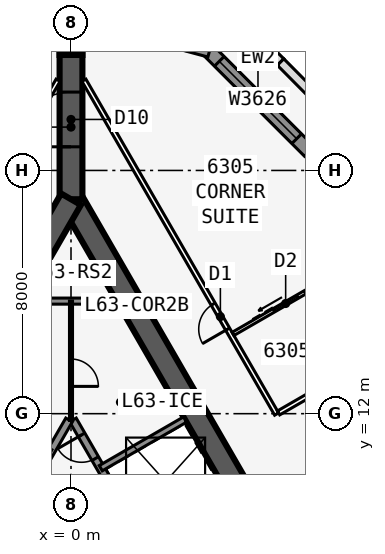
"""IFC4 building model, lengths in metres.
Left out: names, types, materials, properties, quantities, classifications, styles, units other than length and angle.
Written with IfcOpenShell. Run it as: python <this file> out.ifc"""

import sys

from ifc_helpers import new_model, si_unit, direction, frame, frame_2d, origin, place, context, subcontext, project, spatial, polyline, rectangle, outline, extrude, element, fill, save


model = new_model("IFC4")
c1 = context("Model", 3, precision=1e-05, world=origin(), true_north=direction((0.0, 1.0)))
c2 = subcontext(c1, "Body", "Model", "MODEL_VIEW")
j1 = project(units=[si_unit("LENGTHUNIT", "METRE"), si_unit("PLANEANGLEUNIT", "RADIAN")], contexts=[c1])
p1 = place(None, origin())
s1 = spatial("IfcSite", under=j1, at=p1, CompositionType="ELEMENT")
p2 = place(p1, origin())
s2 = spatial("IfcBuilding", under=s1, at=p2, CompositionType="ELEMENT")
p3 = place(p2, frame((0.0, 0.0, 239.3)))
s3 = spatial("IfcBuildingStorey", under=s2, at=p3, CompositionType="ELEMENT", Elevation=239.3)
p4 = place(p3, frame((16.5, -9.526, 0.0), z_axis=(0.0, 0.0, 1.0), x_axis=(-0.499999749417, 0.866025548458, 0.0)))
e1 = element("IfcWall", 1, at=p4, inside=s3, PredefinedType="SHEAR", context=c2, shape_type="SweptSolid", body=[
    extrude(rectangle(XDim=33.0, YDim=0.75, at=frame_2d((16.5, 0.0))), origin(), (0.0, 0.0, 1.0), 3.6),
])
p5 = place(p4, frame((14.15, 0.0, 0.0)))
e2 = element("IfcOpeningElement", 2, at=p5, cuts=e1, PredefinedType="OPENING", context=c2, shape_type="SweptSolid", body=[
    extrude(rectangle(XDim=1.8, YDim=2.13, at=frame_2d((0.9, 1.065))), frame((0.0, 0.385, 0.0), z_axis=(0.0, -1.0, 0.0), x_axis=(1.0, 0.0, 0.0)), (0.0, 0.0, 1.0), 0.77),
])
p6 = place(p4, frame((12.6, 0.0, 0.0)))
e3 = element("IfcOpeningElement", 3, at=p6, cuts=e1, PredefinedType="OPENING", context=c2, shape_type="SweptSolid", body=[
    extrude(rectangle(XDim=1.0, YDim=2.13, at=frame_2d((0.5, 1.065))), frame((0.0, 0.385, 0.0), z_axis=(0.0, -1.0, 0.0), x_axis=(1.0, 0.0, 0.0)), (0.0, 0.0, 1.0), 0.77),
])
p7 = place(p3, frame((5.379, 2.586, 0.0), z_axis=(0.0, 0.0, 1.0), x_axis=(-0.500001375892, 0.866024609411, 0.0)))
e4 = element("IfcWall", 4, at=p7, inside=s3, PredefinedType="SOLIDWALL", context=c2, shape_type="SweptSolid", body=[
    extrude(rectangle(XDim=10.633, YDim=0.25, at=frame_2d((5.316, 0.0))), origin(), (0.0, 0.0, 1.0), 3.435),
])
p8 = place(p7, frame((9.164, 0.0, 0.0)))
e5 = element("IfcOpeningElement", 5, at=p8, cuts=e4, PredefinedType="OPENING", context=c2, shape_type="SweptSolid", body=[
    extrude(rectangle(XDim=0.9, YDim=2.13, at=frame_2d((0.45, 1.065))), frame((0.0, 0.135, 0.0), z_axis=(0.0, -1.0, 0.0), x_axis=(1.0, 0.0, 0.0)), (0.0, 0.0, 1.0), 0.27),
])
p9 = place(p7, frame((1.0, 0.0, 0.0)))
e6 = element("IfcOpeningElement", 6, at=p9, cuts=e4, PredefinedType="OPENING", context=c2, shape_type="SweptSolid", body=[
    extrude(rectangle(XDim=1.1, YDim=2.13, at=frame_2d((0.55, 1.065))), frame((0.0, 0.135, 0.0), z_axis=(0.0, -1.0, 0.0), x_axis=(1.0, 0.0, 0.0)), (0.0, 0.0, 1.0), 0.27),
])
p10 = place(p7, frame((3.9, 0.0, 0.0)))
e7 = element("IfcOpeningElement", 7, at=p10, cuts=e4, PredefinedType="OPENING", context=c2, shape_type="SweptSolid", body=[
    extrude(rectangle(XDim=1.1, YDim=2.13, at=frame_2d((0.55, 1.065))), frame((0.0, 0.135, 0.0), z_axis=(0.0, -1.0, 0.0), x_axis=(1.0, 0.0, 0.0)), (0.0, 0.0, 1.0), 0.27),
])
p11 = place(p7, frame((6.8, 0.0, 0.0)))
e8 = element("IfcOpeningElement", 8, at=p11, cuts=e4, PredefinedType="OPENING", context=c2, shape_type="SweptSolid", body=[
    extrude(rectangle(XDim=1.1, YDim=2.13, at=frame_2d((0.55, 1.065))), frame((0.0, 0.135, 0.0), z_axis=(0.0, -1.0, 0.0), x_axis=(1.0, 0.0, 0.0)), (0.0, 0.0, 1.0), 0.27),
])
p12 = place(p3, frame((0.979, 10.207, 0.0), z_axis=(0.0, 0.0, 1.0), x_axis=(0.866042017984, 0.499971222258, 0.0)))
e9 = element("IfcWall", 9, at=p12, inside=s3, PredefinedType="SOLIDWALL", context=c2, shape_type="SweptSolid", body=[
    extrude(rectangle(XDim=3.2, YDim=0.2, at=frame_2d((1.6, 0.0))), origin(), (0.0, 0.0, 1.0), 3.435),
])
p13 = place(p3, frame((0.0, 19.052, 0.0), z_axis=(0.0, 0.0, 1.0), x_axis=(-0.499999749417, -0.866025548458, 0.0)))
e10 = element("IfcWall", 10, at=p13, inside=s3, PredefinedType="SHEAR", context=c2, shape_type="SweptSolid", body=[
    extrude(rectangle(XDim=33.0, YDim=0.75, at=frame_2d((16.5, 0.0))), origin(), (0.0, 0.0, 1.0), 3.6),
])
p14 = place(p13, frame((14.15, 0.0, 0.0)))
e11 = element("IfcOpeningElement", 11, at=p14, cuts=e10, PredefinedType="OPENING", context=c2, shape_type="SweptSolid", body=[
    extrude(rectangle(XDim=1.8, YDim=2.13, at=frame_2d((0.9, 1.065))), frame((0.0, 0.385, 0.0), z_axis=(0.0, -1.0, 0.0), x_axis=(1.0, 0.0, 0.0)), (0.0, 0.0, 1.0), 0.77),
])
p15 = place(p13, frame((12.6, 0.0, 0.0)))
e12 = element("IfcOpeningElement", 12, at=p15, cuts=e10, PredefinedType="OPENING", context=c2, shape_type="SweptSolid", body=[
    extrude(rectangle(XDim=1.0, YDim=2.13, at=frame_2d((0.5, 1.065))), frame((0.0, 0.385, 0.0), z_axis=(0.0, -1.0, 0.0), x_axis=(1.0, 0.0, 0.0)), (0.0, 0.0, 1.0), 0.77),
])
p16 = place(p3, frame((-0.062, 11.794, 0.0), z_axis=(0.0, 0.0, 1.0), x_axis=(-0.500006680225, -0.86602154692, 0.0)))
e13 = element("IfcWall", 13, at=p16, inside=s3, PredefinedType="SOLIDWALL", context=c2, shape_type="SweptSolid", body=[
    extrude(rectangle(XDim=7.733, YDim=0.25, at=frame_2d((3.866, 0.0))), origin(), (0.0, 0.0, 1.0), 3.435),
])
p17 = place(p3, frame((0.0, 19.052, 0.0), z_axis=(0.0, 0.0, 1.0), x_axis=(0.0, 1.0, 0.0)))
e14 = element("IfcWall", 14, at=p17, inside=s3, PredefinedType="SHEAR", context=c2, shape_type="SweptSolid", body=[
    extrude(rectangle(XDim=4.746, YDim=0.75, at=frame_2d((2.373, 0.0))), origin(), (0.0, 0.0, 1.0), 3.6),
])
p18 = place(p17, frame((1.725, 0.0, 0.0)))
e15 = element("IfcOpeningElement", 15, at=p18, cuts=e14, PredefinedType="OPENING", context=c2, shape_type="SweptSolid", body=[
    extrude(rectangle(XDim=1.8, YDim=2.13, at=frame_2d((0.9, 1.065))), frame((0.0, 0.385, 0.0), z_axis=(0.0, -1.0, 0.0), x_axis=(1.0, 0.0, 0.0)), (0.0, 0.0, 1.0), 0.77),
])
p19 = place(p3, frame((0.0, 23.799, 0.0), z_axis=(0.0, 0.0, 1.0), x_axis=(0.0, 1.0, 0.0)))
e16 = element("IfcWall", 16, at=p19, inside=s3, PredefinedType="SHEAR", context=c2, shape_type="SweptSolid", body=[
    extrude(rectangle(XDim=1.155, YDim=0.75, at=frame_2d((0.577, 0.0))), origin(), (0.0, 0.0, 1.0), 3.6),
])
p20 = place(p3, frame((7.841, 20.625, 0.0), z_axis=(0.0, 0.0, 1.0), x_axis=(-0.707106781187, 0.707106781187, 0.0)))
e17 = element("IfcWall", 17, at=p20, inside=s3, PredefinedType="SOLIDWALL", context=c2, shape_type="SweptSolid", body=[
    extrude(rectangle(XDim=4.781, YDim=0.45, at=frame_2d((2.391, 0.0))), origin(), (0.0, 0.0, 1.0), 3.435),
])
p21 = place(p20, frame((0.591, 0.0, 0.45)))
e18 = element("IfcOpeningElement", 18, at=p21, cuts=e17, PredefinedType="OPENING", context=c2, shape_type="SweptSolid", body=[
    extrude(rectangle(XDim=3.6, YDim=2.6, at=frame_2d((1.8, 1.3))), frame((0.0, 0.235, 0.0), z_axis=(0.0, -1.0, 0.0), x_axis=(1.0, 0.0, 0.0)), (0.0, 0.0, 1.0), 0.47),
])
p22 = place(p3, frame((4.561, 23.948, 0.0), z_axis=(0.0, 0.0, 1.0), x_axis=(-0.965926628191, 0.258816052347, 0.0)))
e19 = element("IfcWall", 19, at=p22, inside=s3, PredefinedType="SOLIDWALL", context=c2, shape_type="SweptSolid", body=[
    extrude(outline(polyline([(4.781, 0.225), (4.722, 0.225), (4.303, 0.113), (4.273, 0.225), (0.0, 0.225), (0.0, -0.225), (4.781, -0.225), (4.781, 0.225)])), origin(), (0.0, 0.0, 1.0), 3.435),
])
p23 = place(p22, frame((0.711, 0.0, 0.45)))
e20 = element("IfcOpeningElement", 20, at=p23, cuts=e19, PredefinedType="OPENING", context=c2, shape_type="SweptSolid", body=[
    extrude(rectangle(XDim=3.0, YDim=2.6, at=frame_2d((1.5, 1.3))), frame((0.0, 0.235, 0.0), z_axis=(0.0, -1.0, 0.0), x_axis=(1.0, 0.0, 0.0)), (0.0, 0.0, 1.0), 0.47),
])
p24 = place(p3, frame((0.058, 25.186, 0.0), z_axis=(0.0, 0.0, 1.0), x_axis=(-0.965926628191, -0.258816052347, 0.0)))
e21 = element("IfcWall", 21, at=p24, inside=s3, PredefinedType="SOLIDWALL", context=c2, shape_type="SweptSolid", body=[
    extrude(outline(polyline([(4.781, 0.225), (0.509, 0.225), (0.479, 0.113), (0.059, 0.225), (0.0, 0.225), (0.0, -0.225), (4.781, -0.225), (4.781, 0.225)])), origin(), (0.0, 0.0, 1.0), 3.435),
])
p25 = place(p24, frame((1.07, 0.0, 0.45)))
e22 = element("IfcOpeningElement", 22, at=p25, cuts=e21, PredefinedType="OPENING", context=c2, shape_type="SweptSolid", body=[
    extrude(rectangle(XDim=3.0, YDim=2.6, at=frame_2d((1.5, 1.3))), frame((0.0, 0.235, 0.0), z_axis=(0.0, -1.0, 0.0), x_axis=(1.0, 0.0, 0.0)), (0.0, 0.0, 1.0), 0.47),
])
p26 = place(p3, frame((3.964, 26.495, 0.0), z_axis=(0.0, 0.0, 1.0), x_axis=(0.707136242128, -0.707077319018, 0.0)))
e23 = element("IfcWall", 23, at=p26, inside=s3, PredefinedType="PARAPET", context=c2, shape_type="SweptSolid", body=[
    extrude(rectangle(XDim=4.143, YDim=0.3, at=frame_2d((2.072, 0.0))), origin(), (0.0, 0.0, 1.0), 1.1),
])
p27 = place(p3, frame((6.894, 23.566, 0.0), z_axis=(0.0, 0.0, 1.0), x_axis=(0.704083858744, -0.710116835356, 0.0)))
e24 = element("IfcWall", 24, at=p27, inside=s3, PredefinedType="PARAPET", context=c2, shape_type="SweptSolid", body=[
    extrude(rectangle(XDim=2.064, YDim=0.3, at=frame_2d((1.032, 0.0))), origin(), (0.0, 0.0, 1.0), 1.1),
])
p28 = place(p3, frame((6.763, 11.988, 0.0), z_axis=(0.0, 0.0, 1.0), x_axis=(-0.49999585592, 0.866027796357, 0.0)))
e25 = element("IfcWall", 25, at=p28, inside=s3, PredefinedType="PARTITIONING", context=c2, shape_type="SweptSolid", body=[
    extrude(rectangle(XDim=12.677, YDim=0.15, at=frame_2d((6.338, 0.0))), origin(), (0.0, 0.0, 1.0), 3.435),
])
p29 = place(p28, frame((3.225, 0.0, 0.0)))
e26 = element("IfcOpeningElement", 26, at=p29, cuts=e25, PredefinedType="OPENING", context=c2, shape_type="SweptSolid", body=[
    extrude(rectangle(XDim=0.95, YDim=2.13, at=frame_2d((0.475, 1.065))), frame((0.0, 0.085, 0.0), z_axis=(0.0, -1.0, 0.0), x_axis=(1.0, 0.0, 0.0)), (0.0, 0.0, 1.0), 0.17),
])
p30 = place(p3, frame((6.829, 12.025, 0.0), z_axis=(0.0, 0.0, 1.0), x_axis=(0.866029323189, 0.499993211332, 0.0)))
e27 = element("IfcWall", 27, at=p30, inside=s3, PredefinedType="PARTITIONING", context=c2, shape_type="SweptSolid", body=[
    extrude(rectangle(XDim=6.608, YDim=0.15, at=frame_2d((3.304, 0.0))), origin(), (0.0, 0.0, 1.0), 2.678),
])
p31 = place(p3, frame((5.329, 14.623, 0.0), z_axis=(0.0, 0.0, 1.0), x_axis=(0.865997131366, 0.500048966069, 0.0)))
e28 = element("IfcWall", 28, at=p31, inside=s3, PredefinedType="PLUMBINGWALL", context=c2, shape_type="SweptSolid", body=[
    extrude(rectangle(XDim=2.74, YDim=0.12, at=frame_2d((1.37, 0.0))), origin(), (0.0, 0.0, 1.0), 3.435),
])
p32 = place(p31, frame((1.55, 0.0, 0.0)))
e29 = element("IfcOpeningElement", 29, at=p32, cuts=e28, PredefinedType="OPENING", context=c2, shape_type="SweptSolid", body=[
    extrude(rectangle(XDim=0.9, YDim=2.13, at=frame_2d((0.45, 1.065))), frame((0.0, 0.07, 0.0), z_axis=(0.0, -1.0, 0.0), x_axis=(1.0, 0.0, 0.0)), (0.0, 0.0, 1.0), 0.14),
])
p33 = place(p3, frame((-0.425, 22.966, 0.0), z_axis=(0.0, 0.0, 1.0), x_axis=(-0.500000265775, -0.866025250339, 0.0)))
e30 = element("IfcWall", 30, at=p33, inside=s3, PredefinedType="PARTITIONING", context=c2, shape_type="SweptSolid", body=[
    extrude(rectangle(XDim=39.354, YDim=0.15, at=frame_2d((19.677, 0.0))), origin(), (0.0, 0.0, 1.0), 3.435),
])
p34 = place(p33, frame((8.502, 0.0, 0.0)))
e31 = element("IfcOpeningElement", 31, at=p34, cuts=e30, PredefinedType="OPENING", context=c2, shape_type="SweptSolid", body=[
    extrude(rectangle(XDim=0.95, YDim=2.13, at=frame_2d((0.475, 1.065))), frame((0.0, 0.085, 0.0), z_axis=(0.0, -1.0, 0.0), x_axis=(1.0, 0.0, 0.0)), (0.0, 0.0, 1.0), 0.17),
])
p35 = place(p33, frame((15.902, 0.0, 0.0)))
e32 = element("IfcOpeningElement", 32, at=p35, cuts=e30, PredefinedType="OPENING", context=c2, shape_type="SweptSolid", body=[
    extrude(rectangle(XDim=0.95, YDim=2.13, at=frame_2d((0.475, 1.065))), frame((0.0, 0.085, 0.0), z_axis=(0.0, -1.0, 0.0), x_axis=(1.0, 0.0, 0.0)), (0.0, 0.0, 1.0), 0.17),
])
p36 = place(p33, frame((22.902, 0.0, 0.0)))
e33 = element("IfcOpeningElement", 33, at=p36, cuts=e30, PredefinedType="OPENING", context=c2, shape_type="SweptSolid", body=[
    extrude(rectangle(XDim=0.95, YDim=2.13, at=frame_2d((0.475, 1.065))), frame((0.0, 0.085, 0.0), z_axis=(0.0, -1.0, 0.0), x_axis=(1.0, 0.0, 0.0)), (0.0, 0.0, 1.0), 0.17),
])
p37 = place(p33, frame((29.902, 0.0, 0.0)))
e34 = element("IfcOpeningElement", 34, at=p37, cuts=e30, PredefinedType="OPENING", context=c2, shape_type="SweptSolid", body=[
    extrude(rectangle(XDim=0.95, YDim=2.13, at=frame_2d((0.475, 1.065))), frame((0.0, 0.085, 0.0), z_axis=(0.0, -1.0, 0.0), x_axis=(1.0, 0.0, 0.0)), (0.0, 0.0, 1.0), 0.17),
])
p38 = place(p3, frame((-1.501, 15.703, 0.0), z_axis=(0.0, 0.0, 1.0), x_axis=(1.0, 0.0, 0.0)))
e35 = element("IfcWall", 35, at=p38, inside=s3, PredefinedType="SOLIDWALL", context=c2, shape_type="SweptSolid", body=[
    extrude(rectangle(XDim=3.002, YDim=0.2, at=frame_2d((1.501, 0.0))), origin(), (0.0, 0.0, 1.0), 3.435),
])
p39 = place(p3, frame((0.0, 15.703, 0.0), z_axis=(0.0, 0.0, 1.0), x_axis=(0.0, -1.0, 0.0)))
e36 = element("IfcWall", 36, at=p39, inside=s3, PredefinedType="PARTITIONING", context=c2, shape_type="SweptSolid", body=[
    extrude(rectangle(XDim=3.925, YDim=0.1, at=frame_2d((1.963, 0.0))), origin(), (0.0, 0.0, 1.0), 3.435),
])
p40 = place(p39, frame((1.905, 0.0, 0.0)))
e37 = element("IfcOpeningElement", 37, at=p40, cuts=e36, PredefinedType="OPENING", context=c2, shape_type="SweptSolid", body=[
    extrude(rectangle(XDim=0.9, YDim=2.13, at=frame_2d((0.45, 1.065))), frame((0.0, 0.06, 0.0), z_axis=(0.0, -1.0, 0.0), x_axis=(1.0, 0.0, 0.0)), (0.0, 0.0, 1.0), 0.12),
])
p41 = place(p21, origin())
e38 = element("IfcWindow", 38, at=p41, inside=s3, PartitioningType="SINGLE_PANEL", PredefinedType="WINDOW", context=c2, shape_type="SweptSolid", body=[
    extrude(rectangle(XDim=3.6, YDim=2.6, at=frame_2d((1.8, 1.3))), frame((0.0, 0.03, 0.0), z_axis=(0.0, -1.0, 0.0), x_axis=(1.0, 0.0, 0.0)), (0.0, 0.0, 1.0), 0.06),
])
fill(e18, e38)
p42 = place(p32, origin())
e39 = element("IfcDoor", 39, at=p42, inside=s3, OperationType="SLIDING_TO_LEFT", PredefinedType="DOOR", context=c2, shape_type="SweptSolid", body=[
    extrude(rectangle(XDim=0.9, YDim=2.13, at=frame_2d((0.45, 1.065))), frame((0.0, 0.025, 0.0), z_axis=(0.0, -1.0, 0.0), x_axis=(1.0, 0.0, 0.0)), (0.0, 0.0, 1.0), 0.05),
])
fill(e29, e39)
p43 = place(p29, origin())
e40 = element("IfcDoor", 40, at=p43, inside=s3, OperationType="SINGLE_SWING_LEFT", PredefinedType="DOOR", context=c2, shape_type="SweptSolid", body=[
    extrude(rectangle(XDim=0.95, YDim=2.13, at=frame_2d((0.475, 1.065))), frame((0.0, 0.025, 0.0), z_axis=(0.0, -1.0, 0.0), x_axis=(1.0, 0.0, 0.0)), (0.0, 0.0, 1.0), 0.05),
])
fill(e26, e40)
p44 = place(p18, origin())
e41 = element("IfcDoor", 41, at=p44, inside=s3, OperationType="DOUBLE_DOOR_DOUBLE_SWING", PredefinedType="DOOR", context=c2, shape_type="SweptSolid", body=[
    extrude(rectangle(XDim=1.8, YDim=2.13, at=frame_2d((0.9, 1.065))), frame((0.0, 0.025, 0.0), z_axis=(0.0, -1.0, 0.0), x_axis=(1.0, 0.0, 0.0)), (0.0, 0.0, 1.0), 0.05),
])
fill(e15, e41)
p45 = place(p8, origin())
e42 = element("IfcDoor", 42, at=p45, inside=s3, OperationType="SINGLE_SWING_RIGHT", PredefinedType="DOOR", context=c2, shape_type="SweptSolid", body=[
    extrude(rectangle(XDim=0.9, YDim=2.13, at=frame_2d((0.45, 1.065))), frame((0.0, 0.025, 0.0), z_axis=(0.0, -1.0, 0.0), x_axis=(1.0, 0.0, 0.0)), (0.0, 0.0, 1.0), 0.05),
])
fill(e5, e42)
p46 = place(p40, origin())
e43 = element("IfcDoor", 43, at=p46, inside=s3, OperationType="SINGLE_SWING_RIGHT", PredefinedType="DOOR", context=c2, shape_type="SweptSolid", body=[
    extrude(rectangle(XDim=0.9, YDim=2.13, at=frame_2d((0.45, 1.065))), frame((0.0, 0.025, 0.0), z_axis=(0.0, -1.0, 0.0), x_axis=(1.0, 0.0, 0.0)), (0.0, 0.0, 1.0), 0.05),
])
fill(e37, e43)
save(model, sys.argv[1])
